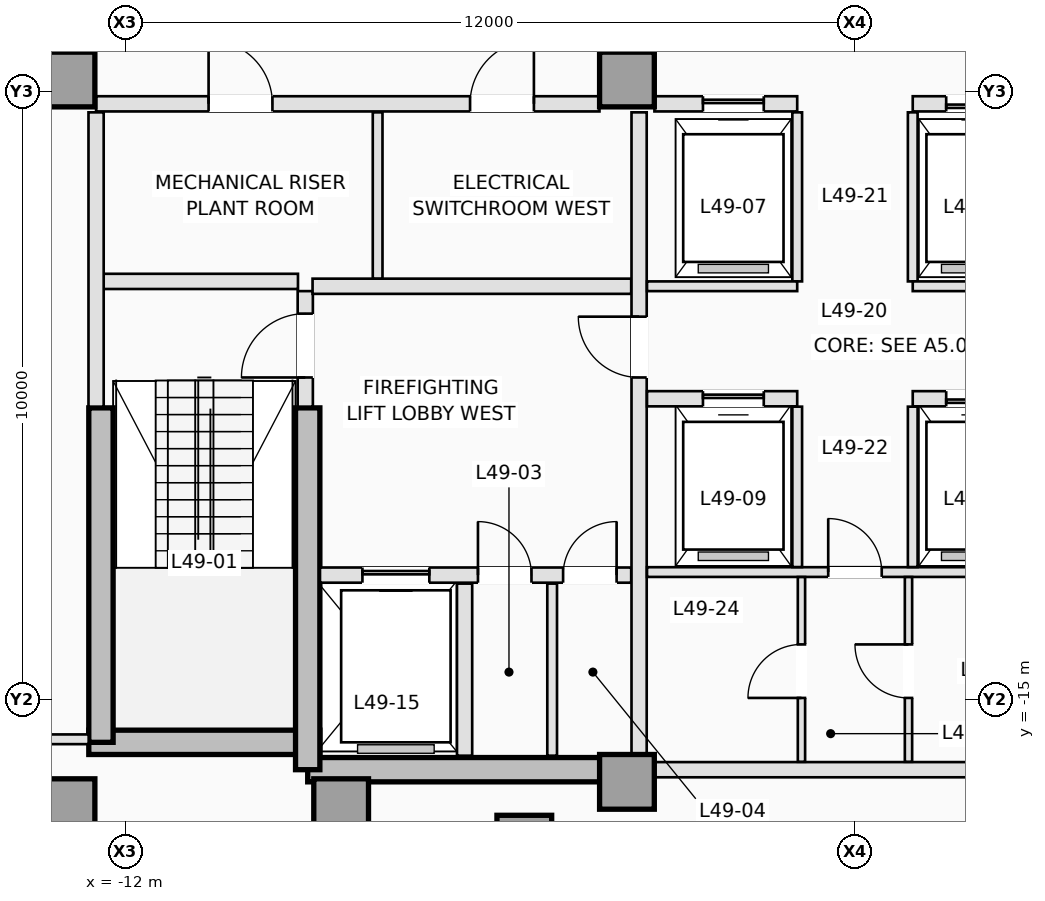
"""IFC4 building model, lengths in metres.
Left out: names, types, materials, properties, quantities, classifications, styles, units other than length and angle.
Written with IfcOpenShell. Run it as: python <this file> out.ifc"""

import sys

from ifc_helpers import new_model, si_unit, direction, frame, frame_2d, origin, origin_2d, place, context, subcontext, project, spatial, rectangle, extrude, element, fill, save


model = new_model("IFC4")
c1 = context("Model", 3, precision=1e-05, world=origin(), true_north=direction((0.0, 1.0)))
c2 = subcontext(c1, "Body", "Model", "MODEL_VIEW")
j1 = project(units=[si_unit("LENGTHUNIT", "METRE"), si_unit("PLANEANGLEUNIT", "RADIAN")], contexts=[c1])
p1 = place(None, origin())
s1 = spatial("IfcSite", under=j1, at=p1, CompositionType="ELEMENT")
p2 = place(p1, origin())
s2 = spatial("IfcBuilding", under=s1, at=p2, CompositionType="ELEMENT")
p3 = place(p2, frame((0.0, 0.0, 179.0)))
s3 = spatial("IfcBuildingStorey", under=s2, at=p3, CompositionType="ELEMENT", Elevation=179.0)
p4 = place(p3, frame((-12.6, -15.7, 0.0), z_axis=(0.0, 0.0, 1.0), x_axis=(1.0, 0.0, 0.0)))
e1 = element("IfcWall", 1, at=p4, inside=s3, PredefinedType="SHEAR", context=c2, shape_type="SweptSolid", body=[
    extrude(rectangle(XDim=3.8, YDim=0.4, at=frame_2d((1.9, 0.0))), origin(), (0.0, 0.0, 1.0), 4.4),
])
p5 = place(p3, frame((-9.0, -16.15, 0.0), z_axis=(0.0, 0.0, 1.0), x_axis=(1.0, 0.0, 0.0)))
e2 = element("IfcWall", 2, at=p5, inside=s3, PredefinedType="SHEAR", context=c2, shape_type="SweptSolid", body=[
    extrude(rectangle(XDim=5.25, YDim=0.4, at=frame_2d((2.625, 0.0))), origin(), (0.0, 0.0, 1.0), 4.4),
])
p6 = place(p3, frame((-12.4, -15.7, 0.0), z_axis=(0.0, 0.0, 1.0), x_axis=(0.0, 1.0, 0.0)))
e3 = element("IfcWall", 3, at=p6, inside=s3, PredefinedType="SHEAR", context=c2, shape_type="SweptSolid", body=[
    extrude(rectangle(XDim=5.5, YDim=0.4, at=frame_2d((2.75, 0.0))), origin(), (0.0, 0.0, 1.0), 4.4),
])
p7 = place(p3, frame((-9.0, -16.15, 0.0), z_axis=(0.0, 0.0, 1.0), x_axis=(0.0, 1.0, 0.0)))
e4 = element("IfcWall", 4, at=p7, inside=s3, PredefinedType="SHEAR", context=c2, shape_type="SweptSolid", body=[
    extrude(rectangle(XDim=5.95, YDim=0.4, at=frame_2d((2.975, 0.0))), origin(), (0.0, 0.0, 1.0), 4.4),
])
for number, where, z_axis, x_axis in (
    (5, (-12.95, -16.75, 0.0), (0.0, 0.0, 1.0), (1.0, 0.0, 0.0)),
    (6, (-8.45, -16.75, 0.0), (0.0, 0.0, 1.0), (1.0, 0.0, 0.0)),
    (7, (-3.75, -16.35, 0.0), (0.0, 0.0, 1.0), (1.0, 0.0, 0.0)),
    (8, (-12.95, -4.8, 0.0), (0.0, 0.0, 1.0), (1.0, 0.0, 0.0)),
    (9, (-3.75, -4.8, 0.0), (0.0, 0.0, 1.0), (1.0, 0.0, 0.0)),
    (10, (-5.438, -17.35, 0.0), (0.0, 0.0, 1.0), (0.0, 1.0, 0.0)),
):
    element("IfcColumn", number, at=place(p3, frame(where, z_axis=z_axis, x_axis=x_axis)), inside=s3, PredefinedType="COLUMN", context=c2, shape_type="SweptSolid", body=[
        extrude(rectangle(XDim=0.9, YDim=0.9, at=origin_2d()), origin(), (0.0, 0.0, 1.0), 4.4),
    ])
p8 = place(p3, frame((-9.04, -10.18, 0.0), z_axis=(0.0, 0.0, 1.0), x_axis=(0.0, 1.0, 0.0)))
e11 = element("IfcWall", 11, at=p8, inside=s3, PredefinedType="PARTITIONING", context=c2, shape_type="SweptSolid", body=[
    extrude(rectangle(XDim=1.9, YDim=0.25, at=frame_2d((0.95, 0.0))), origin(), (0.0, 0.0, 1.0), 4.15),
])
p9 = place(p8, frame((0.48, 0.0, 0.0)))
e12 = element("IfcOpeningElement", 12, at=p9, cuts=e11, PredefinedType="OPENING", context=c2, shape_type="SweptSolid", body=[
    extrude(rectangle(XDim=1.05, YDim=2.15, at=frame_2d((0.525, 1.075))), frame((0.0, 0.135, 0.0), z_axis=(0.0, -1.0, 0.0), x_axis=(1.0, 0.0, 0.0)), (0.0, 0.0, 1.0), 0.27),
])
p10 = place(p3, frame((-12.38, -8.12, 0.0), z_axis=(0.0, 0.0, 1.0), x_axis=(1.0, 0.0, 0.0)))
e13 = element("IfcWall", 13, at=p10, inside=s3, PredefinedType="PARTITIONING", context=c2, shape_type="SweptSolid", body=[
    extrude(rectangle(XDim=3.22, YDim=0.25, at=frame_2d((1.61, 0.0))), origin(), (0.0, 0.0, 1.0), 4.15),
])
p11 = place(p3, frame((-12.48, -10.18, 0.0), z_axis=(0.0, 0.0, 1.0), x_axis=(0.0, 1.0, 0.0)))
e14 = element("IfcWall", 14, at=p11, inside=s3, PredefinedType="PARTITIONING", context=c2, shape_type="SweptSolid", body=[
    extrude(rectangle(XDim=4.84, YDim=0.25, at=frame_2d((2.42, 0.0))), origin(), (0.0, 0.0, 1.0), 4.15),
])
p12 = place(p3, frame((-8.798, -12.95, 0.0), z_axis=(0.0, 0.0, 1.0), x_axis=(1.0, 0.0, 0.0)))
e15 = element("IfcWall", 15, at=p12, inside=s3, PredefinedType="PARTITIONING", context=c2, shape_type="SweptSolid", body=[
    extrude(rectangle(XDim=5.118, YDim=0.25, at=frame_2d((2.559, 0.0))), origin(), (0.0, 0.0, 1.0), 4.15),
])
p13 = place(p12, frame((0.698, 0.0, 0.0)))
e16 = element("IfcOpeningElement", 16, at=p13, cuts=e15, PredefinedType="OPENING", context=c2, shape_type="SweptSolid", body=[
    extrude(rectangle(XDim=1.1, YDim=2.15, at=frame_2d((0.55, 1.075))), frame((0.0, 0.135, 0.0), z_axis=(0.0, -1.0, 0.0), x_axis=(1.0, 0.0, 0.0)), (0.0, 0.0, 1.0), 0.27),
])
p14 = place(p12, frame((2.598, 0.0, 0.0)))
e17 = element("IfcOpeningElement", 17, at=p14, cuts=e15, PredefinedType="OPENING", context=c2, shape_type="SweptSolid", body=[
    extrude(rectangle(XDim=0.88, YDim=2.1, at=frame_2d((0.44, 1.05))), frame((0.0, 0.135, 0.0), z_axis=(0.0, -1.0, 0.0), x_axis=(1.0, 0.0, 0.0)), (0.0, 0.0, 1.0), 0.27),
])
p15 = place(p12, frame((3.998, 0.0, 0.0)))
e18 = element("IfcOpeningElement", 18, at=p15, cuts=e15, PredefinedType="OPENING", context=c2, shape_type="SweptSolid", body=[
    extrude(rectangle(XDim=0.88, YDim=2.1, at=frame_2d((0.44, 1.05))), frame((0.0, 0.135, 0.0), z_axis=(0.0, -1.0, 0.0), x_axis=(1.0, 0.0, 0.0)), (0.0, 0.0, 1.0), 0.27),
])
p16 = place(p3, frame((-6.42, -15.92, 0.0), z_axis=(0.0, 0.0, 1.0), x_axis=(0.0, 1.0, 0.0)))
e19 = element("IfcWall", 19, at=p16, inside=s3, PredefinedType="PARTITIONING", context=c2, shape_type="SweptSolid", body=[
    extrude(rectangle(XDim=2.83, YDim=0.25, at=frame_2d((1.415, 0.0))), origin(), (0.0, 0.0, 1.0), 4.15),
])
p17 = place(p3, frame((-4.98, -15.92, 0.0), z_axis=(0.0, 0.0, 1.0), x_axis=(0.0, 1.0, 0.0)))
e20 = element("IfcWall", 20, at=p17, inside=s3, PredefinedType="PARTITIONING", context=c2, shape_type="SweptSolid", body=[
    extrude(rectangle(XDim=2.83, YDim=0.16, at=frame_2d((1.415, 0.0))), origin(), (0.0, 0.0, 1.0), 4.15),
])
p18 = place(p3, frame((-8.92, -8.2, 0.0), z_axis=(0.0, 0.0, 1.0), x_axis=(1.0, 0.0, 0.0)))
e21 = element("IfcWall", 21, at=p18, inside=s3, PredefinedType="PARTITIONING", context=c2, shape_type="SweptSolid", body=[
    extrude(rectangle(XDim=5.24, YDim=0.25, at=frame_2d((2.62, 0.0))), origin(), (0.0, 0.0, 1.0), 4.15),
])
p19 = place(p3, frame((-3.55, -15.898, 0.0), z_axis=(0.0, 0.0, 1.0), x_axis=(0.0, 1.0, 0.0)))
e22 = element("IfcWall", 22, at=p19, inside=s3, PredefinedType="PARTITIONING", context=c2, shape_type="SweptSolid", body=[
    extrude(rectangle(XDim=10.558, YDim=0.25, at=frame_2d((5.279, 0.0))), origin(), (0.0, 0.0, 1.0), 4.15),
])
p20 = place(p19, frame((6.198, 0.0, 0.0)))
e23 = element("IfcOpeningElement", 23, at=p20, cuts=e22, PredefinedType="OPENING", context=c2, shape_type="SweptSolid", body=[
    extrude(rectangle(XDim=1.0, YDim=2.15, at=frame_2d((0.5, 1.075))), frame((0.0, 0.135, 0.0), z_axis=(0.0, -1.0, 0.0), x_axis=(1.0, 0.0, 0.0)), (0.0, 0.0, 1.0), 0.27),
])
p21 = place(p3, frame((-12.48, -5.2, 0.0), z_axis=(0.0, 0.0, 1.0), x_axis=(1.0, 0.0, 0.0)))
e24 = element("IfcWall", 24, at=p21, inside=s3, PredefinedType="PARTITIONING", context=c2, shape_type="SweptSolid", body=[
    extrude(rectangle(XDim=8.278, YDim=0.25, at=frame_2d((4.139, 0.0))), origin(), (0.0, 0.0, 1.0), 4.15),
])
p22 = place(p21, frame((1.85, 0.0, 0.0)))
e25 = element("IfcOpeningElement", 25, at=p22, cuts=e24, PredefinedType="OPENING", context=c2, shape_type="SweptSolid", body=[
    extrude(rectangle(XDim=1.05, YDim=2.12, at=frame_2d((0.525, 1.06))), frame((0.0, 0.135, 0.0), z_axis=(0.0, -1.0, 0.0), x_axis=(1.0, 0.0, 0.0)), (0.0, 0.0, 1.0), 0.27),
])
p23 = place(p21, frame((6.15, 0.0, 0.0)))
e26 = element("IfcOpeningElement", 26, at=p23, cuts=e24, PredefinedType="OPENING", context=c2, shape_type="SweptSolid", body=[
    extrude(rectangle(XDim=1.05, YDim=2.12, at=frame_2d((0.525, 1.06))), frame((0.0, 0.135, 0.0), z_axis=(0.0, -1.0, 0.0), x_axis=(1.0, 0.0, 0.0)), (0.0, 0.0, 1.0), 0.27),
])
p24 = place(p3, frame((-3.298, -5.2, 0.0), z_axis=(0.0, 0.0, 1.0), x_axis=(1.0, 0.0, 0.0)))
e27 = element("IfcWall", 27, at=p24, inside=s3, PredefinedType="PARTITIONING", context=c2, shape_type="SweptSolid", body=[
    extrude(rectangle(XDim=2.348, YDim=0.25, at=frame_2d((1.174, 0.0))), origin(), (0.0, 0.0, 1.0), 4.15),
])
p25 = place(p24, frame((0.798, 0.0, 0.0)))
e28 = element("IfcOpeningElement", 28, at=p25, cuts=e27, PredefinedType="OPENING", context=c2, shape_type="SweptSolid", body=[
    extrude(rectangle(XDim=1.0, YDim=2.15, at=frame_2d((0.5, 1.075))), frame((0.0, 0.135, 0.0), z_axis=(0.0, -1.0, 0.0), x_axis=(1.0, 0.0, 0.0)), (0.0, 0.0, 1.0), 0.27),
])
p26 = place(p3, frame((0.95, -5.2, 0.0), z_axis=(0.0, 0.0, 1.0), x_axis=(1.0, 0.0, 0.0)))
e29 = element("IfcWall", 29, at=p26, inside=s3, PredefinedType="PARTITIONING", context=c2, shape_type="SweptSolid", body=[
    extrude(rectangle(XDim=2.348, YDim=0.25, at=frame_2d((1.174, 0.0))), origin(), (0.0, 0.0, 1.0), 4.15),
])
p27 = place(p26, frame((0.55, 0.0, 0.0)))
e30 = element("IfcOpeningElement", 30, at=p27, cuts=e29, PredefinedType="OPENING", context=c2, shape_type="SweptSolid", body=[
    extrude(rectangle(XDim=1.0, YDim=2.15, at=frame_2d((0.5, 1.075))), frame((0.0, 0.135, 0.0), z_axis=(0.0, -1.0, 0.0), x_axis=(1.0, 0.0, 0.0)), (0.0, 0.0, 1.0), 0.27),
])
p28 = place(p3, frame((-7.85, -8.073, 0.0), z_axis=(0.0, 0.0, 1.0), x_axis=(0.0, 1.0, 0.0)))
e31 = element("IfcWall", 31, at=p28, inside=s3, PredefinedType="PARTITIONING", context=c2, shape_type="SweptSolid", body=[
    extrude(rectangle(XDim=2.733, YDim=0.16, at=frame_2d((1.366, 0.0))), origin(), (0.0, 0.0, 1.0), 4.15),
])
p29 = place(p3, frame((-3.298, -16.15, 0.0), z_axis=(0.0, 0.0, 1.0), x_axis=(1.0, 0.0, 0.0)))
e32 = element("IfcWall", 32, at=p29, inside=s3, PredefinedType="PARTITIONING", context=c2, shape_type="SweptSolid", body=[
    extrude(rectangle(XDim=6.596, YDim=0.25, at=frame_2d((3.298, 0.0))), origin(), (0.0, 0.0, 1.0), 3.35),
])
for number, where, z_axis, x_axis in (
    (33, (-0.95, -8.12, 0.0), (0.0, 0.0, 1.0), (0.0, 1.0, 0.0)),
    (34, (0.95, -8.12, 0.0), (0.0, 0.0, 1.0), (0.0, 1.0, 0.0)),
):
    element("IfcWall", number, at=place(p3, frame(where, z_axis=z_axis, x_axis=x_axis)), inside=s3, PredefinedType="PARTITIONING", context=c2, shape_type="SweptSolid", body=[
        extrude(rectangle(XDim=2.78, YDim=0.16, at=frame_2d((1.39, 0.0))), origin(), (0.0, 0.0, 1.0), 4.15),
    ])
for number, where, z_axis, x_axis in (
    (35, (-3.42, -8.2, 0.0), (0.0, 0.0, 1.0), (1.0, 0.0, 0.0)),
    (36, (0.95, -8.2, 0.0), (0.0, 0.0, 1.0), (1.0, 0.0, 0.0)),
):
    element("IfcWall", number, at=place(p3, frame(where, z_axis=z_axis, x_axis=x_axis)), inside=s3, PredefinedType="PARTITIONING", context=c2, shape_type="SweptSolid", body=[
        extrude(rectangle(XDim=2.47, YDim=0.16, at=frame_2d((1.235, 0.0))), origin(), (0.0, 0.0, 1.0), 4.15),
    ])
p30 = place(p3, frame((-3.42, -10.05, 0.0), z_axis=(0.0, 0.0, 1.0), x_axis=(1.0, 0.0, 0.0)))
e37 = element("IfcWall", 37, at=p30, inside=s3, PredefinedType="PARTITIONING", context=c2, shape_type="SweptSolid", body=[
    extrude(rectangle(XDim=2.47, YDim=0.25, at=frame_2d((1.235, 0.0))), origin(), (0.0, 0.0, 1.0), 4.15),
])
p31 = place(p30, frame((0.92, 0.0, 0.0)))
e38 = element("IfcOpeningElement", 38, at=p31, cuts=e37, PredefinedType="OPENING", context=c2, shape_type="SweptSolid", body=[
    extrude(rectangle(XDim=1.0, YDim=2.15, at=frame_2d((0.5, 1.075))), frame((0.0, 0.135, 0.0), z_axis=(0.0, -1.0, 0.0), x_axis=(1.0, 0.0, 0.0)), (0.0, 0.0, 1.0), 0.27),
])
p32 = place(p3, frame((0.95, -10.05, 0.0), z_axis=(0.0, 0.0, 1.0), x_axis=(1.0, 0.0, 0.0)))
e39 = element("IfcWall", 39, at=p32, inside=s3, PredefinedType="PARTITIONING", context=c2, shape_type="SweptSolid", body=[
    extrude(rectangle(XDim=2.47, YDim=0.25, at=frame_2d((1.235, 0.0))), origin(), (0.0, 0.0, 1.0), 4.15),
])
p33 = place(p32, frame((0.55, 0.0, 0.0)))
e40 = element("IfcOpeningElement", 40, at=p33, cuts=e39, PredefinedType="OPENING", context=c2, shape_type="SweptSolid", body=[
    extrude(rectangle(XDim=1.0, YDim=2.15, at=frame_2d((0.5, 1.075))), frame((0.0, 0.135, 0.0), z_axis=(0.0, -1.0, 0.0), x_axis=(1.0, 0.0, 0.0)), (0.0, 0.0, 1.0), 0.27),
])
p34 = place(p3, frame((-3.42, -12.9, 0.0), z_axis=(0.0, 0.0, 1.0), x_axis=(1.0, 0.0, 0.0)))
e41 = element("IfcWall", 41, at=p34, inside=s3, PredefinedType="PARTITIONING", context=c2, shape_type="SweptSolid", body=[
    extrude(rectangle(XDim=6.84, YDim=0.16, at=frame_2d((3.42, 0.0))), origin(), (0.0, 0.0, 1.0), 4.15),
])
p35 = place(p34, frame((2.98, 0.0, 0.0)))
e42 = element("IfcOpeningElement", 42, at=p35, cuts=e41, PredefinedType="OPENING", context=c2, shape_type="SweptSolid", body=[
    extrude(rectangle(XDim=0.88, YDim=2.12, at=frame_2d((0.44, 1.06))), frame((0.0, 0.09, 0.0), z_axis=(0.0, -1.0, 0.0), x_axis=(1.0, 0.0, 0.0)), (0.0, 0.0, 1.0), 0.18),
])
for number, where, z_axis, x_axis in (
    (43, (-0.95, -12.818, 0.0), (0.0, 0.0, 1.0), (0.0, 1.0, 0.0)),
    (44, (0.95, -12.818, 0.0), (0.0, 0.0, 1.0), (0.0, 1.0, 0.0)),
):
    element("IfcWall", number, at=place(p3, frame(where, z_axis=z_axis, x_axis=x_axis)), inside=s3, PredefinedType="PARTITIONING", context=c2, shape_type="SweptSolid", body=[
        extrude(rectangle(XDim=2.638, YDim=0.16, at=frame_2d((1.319, 0.0))), origin(), (0.0, 0.0, 1.0), 4.15),
    ])
p36 = place(p3, frame((-0.88, -16.02, 0.0), z_axis=(0.0, 0.0, 1.0), x_axis=(0.0, 1.0, 0.0)))
e45 = element("IfcWall", 45, at=p36, inside=s3, PredefinedType="PARTITIONING", context=c2, shape_type="SweptSolid", body=[
    extrude(rectangle(XDim=3.038, YDim=0.12, at=frame_2d((1.519, 0.0))), origin(), (0.0, 0.0, 1.0), 4.15),
])
p37 = place(p36, frame((1.05, 0.0, 0.0)))
e46 = element("IfcOpeningElement", 46, at=p37, cuts=e45, PredefinedType="OPENING", context=c2, shape_type="SweptSolid", body=[
    extrude(rectangle(XDim=0.88, YDim=2.12, at=frame_2d((0.44, 1.06))), frame((0.0, 0.07, 0.0), z_axis=(0.0, -1.0, 0.0), x_axis=(1.0, 0.0, 0.0)), (0.0, 0.0, 1.0), 0.14),
])
p38 = place(p3, frame((0.88, -16.02, 0.0), z_axis=(0.0, 0.0, 1.0), x_axis=(0.0, 1.0, 0.0)))
e47 = element("IfcWall", 47, at=p38, inside=s3, PredefinedType="PARTITIONING", context=c2, shape_type="SweptSolid", body=[
    extrude(rectangle(XDim=3.038, YDim=0.12, at=frame_2d((1.519, 0.0))), origin(), (0.0, 0.0, 1.0), 4.15),
])
p39 = place(p38, frame((1.05, 0.0, 0.0)))
e48 = element("IfcOpeningElement", 48, at=p39, cuts=e47, PredefinedType="OPENING", context=c2, shape_type="SweptSolid", body=[
    extrude(rectangle(XDim=0.88, YDim=2.12, at=frame_2d((0.44, 1.06))), frame((0.0, 0.07, 0.0), z_axis=(0.0, -1.0, 0.0), x_axis=(1.0, 0.0, 0.0)), (0.0, 0.0, 1.0), 0.14),
])
p40 = place(p3, frame((-16.371, -15.65, 0.0), z_axis=(0.0, 0.0, 1.0), x_axis=(1.0, 0.0, 0.0)))
e49 = element("IfcWall", 49, at=p40, inside=s3, PredefinedType="PARTITIONING", context=c2, shape_type="SweptSolid", body=[
    extrude(rectangle(XDim=3.769, YDim=0.16, at=frame_2d((1.884, 0.0))), origin(), (0.0, 0.0, 1.0), 4.15),
])
p41 = place(p25, origin())
e50 = element("IfcDoor", 50, at=p41, inside=s3, OperationType="SLIDING_TO_LEFT", PredefinedType="DOOR", context=c2, shape_type="SweptSolid", body=[
    extrude(rectangle(XDim=1.0, YDim=2.15, at=frame_2d((0.5, 1.075))), frame((0.0, 0.025, 0.0), z_axis=(0.0, -1.0, 0.0), x_axis=(1.0, 0.0, 0.0)), (0.0, 0.0, 1.0), 0.05),
])
fill(e28, e50)
p42 = place(p27, origin())
e51 = element("IfcDoor", 51, at=p42, inside=s3, OperationType="SLIDING_TO_RIGHT", PredefinedType="DOOR", context=c2, shape_type="SweptSolid", body=[
    extrude(rectangle(XDim=1.0, YDim=2.15, at=frame_2d((0.5, 1.075))), frame((0.0, 0.025, 0.0), z_axis=(0.0, -1.0, 0.0), x_axis=(1.0, 0.0, 0.0)), (0.0, 0.0, 1.0), 0.05),
])
fill(e30, e51)
p43 = place(p13, origin())
e52 = element("IfcDoor", 52, at=p43, inside=s3, OperationType="SLIDING_TO_LEFT", PredefinedType="DOOR", context=c2, shape_type="SweptSolid", body=[
    extrude(rectangle(XDim=1.1, YDim=2.15, at=frame_2d((0.55, 1.075))), frame((0.0, 0.025, 0.0), z_axis=(0.0, -1.0, 0.0), x_axis=(1.0, 0.0, 0.0)), (0.0, 0.0, 1.0), 0.05),
])
fill(e16, e52)
p44 = place(p31, origin())
e53 = element("IfcDoor", 53, at=p44, inside=s3, OperationType="SLIDING_TO_LEFT", PredefinedType="DOOR", context=c2, shape_type="SweptSolid", body=[
    extrude(rectangle(XDim=1.0, YDim=2.15, at=frame_2d((0.5, 1.075))), frame((0.0, 0.025, 0.0), z_axis=(0.0, -1.0, 0.0), x_axis=(1.0, 0.0, 0.0)), (0.0, 0.0, 1.0), 0.05),
])
fill(e38, e53)
p45 = place(p33, origin())
e54 = element("IfcDoor", 54, at=p45, inside=s3, OperationType="SLIDING_TO_RIGHT", PredefinedType="DOOR", context=c2, shape_type="SweptSolid", body=[
    extrude(rectangle(XDim=1.0, YDim=2.15, at=frame_2d((0.5, 1.075))), frame((0.0, 0.025, 0.0), z_axis=(0.0, -1.0, 0.0), x_axis=(1.0, 0.0, 0.0)), (0.0, 0.0, 1.0), 0.05),
])
fill(e40, e54)
p46 = place(p9, origin())
e55 = element("IfcDoor", 55, at=p46, inside=s3, OperationType="SINGLE_SWING_LEFT", PredefinedType="DOOR", context=c2, shape_type="SweptSolid", body=[
    extrude(rectangle(XDim=1.05, YDim=2.15, at=frame_2d((0.525, 1.075))), frame((0.0, 0.025, 0.0), z_axis=(0.0, -1.0, 0.0), x_axis=(1.0, 0.0, 0.0)), (0.0, 0.0, 1.0), 0.05),
])
fill(e12, e55)
p47 = place(p14, origin())
e56 = element("IfcDoor", 56, at=p47, inside=s3, OperationType="SINGLE_SWING_LEFT", PredefinedType="TRAPDOOR", context=c2, shape_type="SweptSolid", body=[
    extrude(rectangle(XDim=0.88, YDim=2.1, at=frame_2d((0.44, 1.05))), frame((0.0, 0.025, 0.0), z_axis=(0.0, -1.0, 0.0), x_axis=(1.0, 0.0, 0.0)), (0.0, 0.0, 1.0), 0.05),
])
fill(e17, e56)
p48 = place(p15, origin())
e57 = element("IfcDoor", 57, at=p48, inside=s3, OperationType="SINGLE_SWING_RIGHT", PredefinedType="TRAPDOOR", context=c2, shape_type="SweptSolid", body=[
    extrude(rectangle(XDim=0.88, YDim=2.1, at=frame_2d((0.44, 1.05))), frame((0.0, 0.025, 0.0), z_axis=(0.0, -1.0, 0.0), x_axis=(1.0, 0.0, 0.0)), (0.0, 0.0, 1.0), 0.05),
])
fill(e18, e57)
p49 = place(p20, origin())
e58 = element("IfcDoor", 58, at=p49, inside=s3, OperationType="SINGLE_SWING_RIGHT", PredefinedType="DOOR", context=c2, shape_type="SweptSolid", body=[
    extrude(rectangle(XDim=1.0, YDim=2.15, at=frame_2d((0.5, 1.075))), frame((0.0, 0.025, 0.0), z_axis=(0.0, -1.0, 0.0), x_axis=(1.0, 0.0, 0.0)), (0.0, 0.0, 1.0), 0.05),
])
fill(e23, e58)
p50 = place(p22, origin())
e59 = element("IfcDoor", 59, at=p50, inside=s3, OperationType="SINGLE_SWING_LEFT", PredefinedType="DOOR", context=c2, shape_type="SweptSolid", body=[
    extrude(rectangle(XDim=1.05, YDim=2.12, at=frame_2d((0.525, 1.06))), frame((0.0, 0.025, 0.0), z_axis=(0.0, -1.0, 0.0), x_axis=(1.0, 0.0, 0.0)), (0.0, 0.0, 1.0), 0.05),
])
fill(e25, e59)
p51 = place(p23, origin())
e60 = element("IfcDoor", 60, at=p51, inside=s3, OperationType="SINGLE_SWING_RIGHT", PredefinedType="DOOR", context=c2, shape_type="SweptSolid", body=[
    extrude(rectangle(XDim=1.05, YDim=2.12, at=frame_2d((0.525, 1.06))), frame((0.0, 0.025, 0.0), z_axis=(0.0, -1.0, 0.0), x_axis=(1.0, 0.0, 0.0)), (0.0, 0.0, 1.0), 0.05),
])
fill(e26, e60)
p52 = place(p35, origin())
e61 = element("IfcDoor", 61, at=p52, inside=s3, OperationType="SINGLE_SWING_LEFT", PredefinedType="DOOR", context=c2, shape_type="SweptSolid", body=[
    extrude(rectangle(XDim=0.88, YDim=2.12, at=frame_2d((0.44, 1.06))), frame((0.0, 0.025, 0.0), z_axis=(0.0, -1.0, 0.0), x_axis=(1.0, 0.0, 0.0)), (0.0, 0.0, 1.0), 0.05),
])
fill(e42, e61)
p53 = place(p37, origin())
e62 = element("IfcDoor", 62, at=p53, inside=s3, OperationType="SINGLE_SWING_LEFT", PredefinedType="DOOR", context=c2, shape_type="SweptSolid", body=[
    extrude(rectangle(XDim=0.88, YDim=2.12, at=frame_2d((0.44, 1.06))), frame((0.0, 0.025, 0.0), z_axis=(0.0, -1.0, 0.0), x_axis=(1.0, 0.0, 0.0)), (0.0, 0.0, 1.0), 0.05),
])
fill(e46, e62)
p54 = place(p39, origin())
e63 = element("IfcDoor", 63, at=p54, inside=s3, OperationType="SINGLE_SWING_RIGHT", PredefinedType="DOOR", context=c2, shape_type="SweptSolid", body=[
    extrude(rectangle(XDim=0.88, YDim=2.12, at=frame_2d((0.44, 1.06))), frame((0.0, 0.025, 0.0), z_axis=(0.0, -1.0, 0.0), x_axis=(1.0, 0.0, 0.0)), (0.0, 0.0, 1.0), 0.05),
])
fill(e48, e63)
save(model, sys.argv[1])
